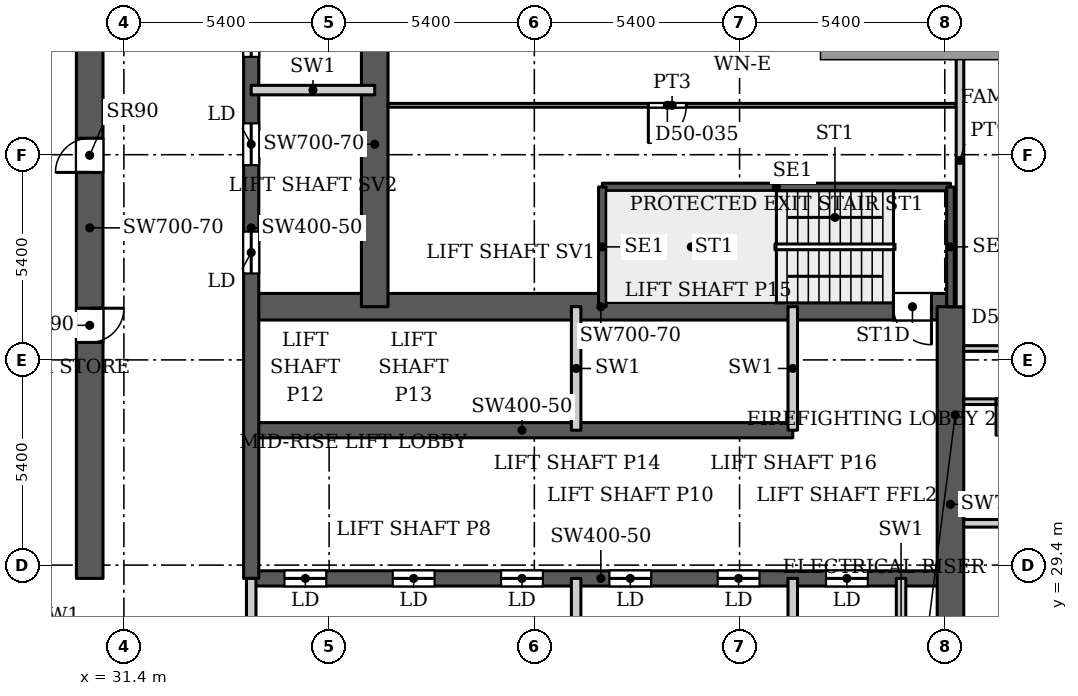
"""IFC4 building model, lengths in metres.
Left out: names, types, materials, properties, quantities, classifications, styles, units other than length and angle.
Written with IfcOpenShell. Run it as: python <this file> out.ifc"""

import sys

from ifc_helpers import new_model, si_unit, direction, frame, frame_2d, origin, place, context, subcontext, project, spatial, rectangle, extrude, source, transform, mapped, element, fill, save


model = new_model("IFC4")
c1 = context("Model", 3, precision=1e-05, world=origin(), true_north=direction((0.0, 1.0)))
c2 = subcontext(c1, "Body", "Model", "MODEL_VIEW")
j1 = project(units=[si_unit("LENGTHUNIT", "METRE"), si_unit("PLANEANGLEUNIT", "RADIAN")], contexts=[c1])
p1 = place(None, origin())
s1 = spatial("IfcSite", under=j1, at=p1, CompositionType="ELEMENT")
p2 = place(p1, origin())
s2 = spatial("IfcBuilding", under=s1, at=p2, CompositionType="ELEMENT")
p3 = place(p2, frame((0.0, 0.0, 216.2)))
s3 = spatial("IfcBuildingStorey", under=s2, at=p3, CompositionType="ELEMENT", Elevation=216.2)
p4 = place(p3, frame((34.75, 29.05, 0.0), z_axis=(0.0, 0.0, 1.0), x_axis=(1.0, 0.0, 0.0)))
e1 = element("IfcWall", 1, at=p4, inside=s3, PredefinedType="SHEAR", context=c2, shape_type="SweptSolid", body=[
    extrude(rectangle(XDim=18.4, YDim=0.4, at=frame_2d((9.2, 0.0))), origin(), (0.0, 0.0, 1.0), 3.9),
])
p5 = place(p4, frame((0.875, 0.0, 0.0)))
e2 = element("IfcOpeningElement", 2, at=p5, cuts=e1, PredefinedType="OPENING", context=c2, shape_type="SweptSolid", body=[
    extrude(rectangle(XDim=1.1, YDim=2.2, at=frame_2d((0.55, 1.1))), frame((0.0, 0.21, 0.0), z_axis=(0.0, -1.0, 0.0), x_axis=(1.0, 0.0, 0.0)), (0.0, 0.0, 1.0), 0.42),
])
p6 = place(p4, frame((3.725, 0.0, 0.0)))
e3 = element("IfcOpeningElement", 3, at=p6, cuts=e1, PredefinedType="OPENING", context=c2, shape_type="SweptSolid", body=[
    extrude(rectangle(XDim=1.1, YDim=2.2, at=frame_2d((0.55, 1.1))), frame((0.0, 0.21, 0.0), z_axis=(0.0, -1.0, 0.0), x_axis=(1.0, 0.0, 0.0)), (0.0, 0.0, 1.0), 0.42),
])
p7 = place(p4, frame((6.575, 0.0, 0.0)))
e4 = element("IfcOpeningElement", 4, at=p7, cuts=e1, PredefinedType="OPENING", context=c2, shape_type="SweptSolid", body=[
    extrude(rectangle(XDim=1.1, YDim=2.2, at=frame_2d((0.55, 1.1))), frame((0.0, 0.21, 0.0), z_axis=(0.0, -1.0, 0.0), x_axis=(1.0, 0.0, 0.0)), (0.0, 0.0, 1.0), 0.42),
])
p8 = place(p4, frame((9.425, 0.0, 0.0)))
e5 = element("IfcOpeningElement", 5, at=p8, cuts=e1, PredefinedType="OPENING", context=c2, shape_type="SweptSolid", body=[
    extrude(rectangle(XDim=1.1, YDim=2.2, at=frame_2d((0.55, 1.1))), frame((0.0, 0.21, 0.0), z_axis=(0.0, -1.0, 0.0), x_axis=(1.0, 0.0, 0.0)), (0.0, 0.0, 1.0), 0.42),
])
p9 = place(p4, frame((12.275, 0.0, 0.0)))
e6 = element("IfcOpeningElement", 6, at=p9, cuts=e1, PredefinedType="OPENING", context=c2, shape_type="SweptSolid", body=[
    extrude(rectangle(XDim=1.1, YDim=2.2, at=frame_2d((0.55, 1.1))), frame((0.0, 0.21, 0.0), z_axis=(0.0, -1.0, 0.0), x_axis=(1.0, 0.0, 0.0)), (0.0, 0.0, 1.0), 0.42),
])
p10 = place(p4, frame((15.125, 0.0, 0.0)))
e7 = element("IfcOpeningElement", 7, at=p10, cuts=e1, PredefinedType="OPENING", context=c2, shape_type="SweptSolid", body=[
    extrude(rectangle(XDim=1.1, YDim=2.2, at=frame_2d((0.55, 1.1))), frame((0.0, 0.21, 0.0), z_axis=(0.0, -1.0, 0.0), x_axis=(1.0, 0.0, 0.0)), (0.0, 0.0, 1.0), 0.42),
])
p11 = place(p3, frame((34.75, 32.95, 0.0), z_axis=(0.0, 0.0, 1.0), x_axis=(1.0, 0.0, 0.0)))
e8 = element("IfcWall", 8, at=p11, inside=s3, PredefinedType="SHEAR", context=c2, shape_type="SweptSolid", body=[
    extrude(rectangle(XDim=14.25, YDim=0.4, at=frame_2d((7.125, 0.0))), origin(), (0.0, 0.0, 1.0), 3.9),
])
p12 = place(p3, frame((34.75, 36.2, 0.0), z_axis=(0.0, 0.0, 1.0), x_axis=(1.0, 0.0, 0.0)))
e9 = element("IfcWall", 9, at=p12, inside=s3, PredefinedType="SHEAR", context=c2, shape_type="SweptSolid", body=[
    extrude(rectangle(XDim=18.4, YDim=0.7, at=frame_2d((9.2, 0.0))), origin(), (0.0, 0.0, 1.0), 3.9),
])
p13 = place(p12, frame((16.9, 0.0, 0.0)))
e10 = element("IfcOpeningElement", 10, at=p13, cuts=e9, PredefinedType="OPENING", context=c2, shape_type="SweptSolid", body=[
    extrude(rectangle(XDim=1.0, YDim=2.2, at=frame_2d((0.5, 1.1))), frame((0.0, 0.36, 0.0), z_axis=(0.0, -1.0, 0.0), x_axis=(1.0, 0.0, 0.0)), (0.0, 0.0, 1.0), 0.72),
])
p14 = place(p3, frame((34.75, 29.05, 0.0), z_axis=(0.0, 0.0, 1.0), x_axis=(0.0, 1.0, 0.0)))
e11 = element("IfcWall", 11, at=p14, inside=s3, PredefinedType="SHEAR", context=c2, shape_type="SweptSolid", body=[
    extrude(rectangle(XDim=18.45, YDim=0.4, at=frame_2d((9.225, 0.0))), origin(), (0.0, 0.0, 1.0), 3.9),
])
p15 = place(p14, frame((8.025, 0.0, 0.0)))
e12 = element("IfcOpeningElement", 12, at=p15, cuts=e11, PredefinedType="OPENING", context=c2, shape_type="SweptSolid", body=[
    extrude(rectangle(XDim=1.1, YDim=2.2, at=frame_2d((0.55, 1.1))), frame((0.0, 0.21, 0.0), z_axis=(0.0, -1.0, 0.0), x_axis=(1.0, 0.0, 0.0)), (0.0, 0.0, 1.0), 0.42),
])
p16 = place(p14, frame((10.875, 0.0, 0.0)))
e13 = element("IfcOpeningElement", 13, at=p16, cuts=e11, PredefinedType="OPENING", context=c2, shape_type="SweptSolid", body=[
    extrude(rectangle(XDim=1.1, YDim=2.2, at=frame_2d((0.55, 1.1))), frame((0.0, 0.21, 0.0), z_axis=(0.0, -1.0, 0.0), x_axis=(1.0, 0.0, 0.0)), (0.0, 0.0, 1.0), 0.42),
])
p17 = place(p14, frame((13.725, 0.0, 0.0)))
e14 = element("IfcOpeningElement", 14, at=p17, cuts=e11, PredefinedType="OPENING", context=c2, shape_type="SweptSolid", body=[
    extrude(rectangle(XDim=1.1, YDim=2.2, at=frame_2d((0.55, 1.1))), frame((0.0, 0.21, 0.0), z_axis=(0.0, -1.0, 0.0), x_axis=(1.0, 0.0, 0.0)), (0.0, 0.0, 1.0), 0.42),
])
p18 = place(p14, frame((15.95, 0.0, 0.0)))
e15 = element("IfcOpeningElement", 15, at=p18, cuts=e11, PredefinedType="OPENING", context=c2, shape_type="SweptSolid", body=[
    extrude(rectangle(XDim=1.1, YDim=2.2, at=frame_2d((0.55, 1.1))), frame((0.0, 0.21, 0.0), z_axis=(0.0, -1.0, 0.0), x_axis=(1.0, 0.0, 0.0)), (0.0, 0.0, 1.0), 0.42),
])
p19 = place(p3, frame((38.0, 36.2, 0.0), z_axis=(0.0, 0.0, 1.0), x_axis=(0.0, 1.0, 0.0)))
e16 = element("IfcWall", 16, at=p19, inside=s3, PredefinedType="SHEAR", context=c2, shape_type="SweptSolid", body=[
    extrude(rectangle(XDim=8.55, YDim=0.7, at=frame_2d((4.275, 0.0))), origin(), (0.0, 0.0, 1.0), 3.9),
])
p20 = place(p3, frame((30.5, 29.05, 0.0), z_axis=(0.0, 0.0, 1.0), x_axis=(0.0, 1.0, 0.0)))
e17 = element("IfcWall", 17, at=p20, inside=s3, PredefinedType="SHEAR", context=c2, shape_type="SweptSolid", body=[
    extrude(rectangle(XDim=18.45, YDim=0.7, at=frame_2d((9.225, 0.0))), origin(), (0.0, 0.0, 1.0), 3.9),
])
p21 = place(p20, frame((6.21, 0.0, 0.0)))
e18 = element("IfcOpeningElement", 18, at=p21, cuts=e17, PredefinedType="OPENING", context=c2, shape_type="SweptSolid", body=[
    extrude(rectangle(XDim=0.9, YDim=2.2, at=frame_2d((0.45, 1.1))), frame((0.0, 0.36, 0.0), z_axis=(0.0, -1.0, 0.0), x_axis=(1.0, 0.0, 0.0)), (0.0, 0.0, 1.0), 0.72),
])
p22 = place(p20, frame((10.684, 0.0, 0.0)))
e19 = element("IfcOpeningElement", 19, at=p22, cuts=e17, PredefinedType="OPENING", context=c2, shape_type="SweptSolid", body=[
    extrude(rectangle(XDim=0.9, YDim=2.2, at=frame_2d((0.45, 1.1))), frame((0.0, 0.36, 0.0), z_axis=(0.0, -1.0, 0.0), x_axis=(1.0, 0.0, 0.0)), (0.0, 0.0, 1.0), 0.72),
])
p23 = place(p3, frame((53.15, 25.8, 0.0), z_axis=(0.0, 0.0, 1.0), x_axis=(0.0, 1.0, 0.0)))
e20 = element("IfcWall", 20, at=p23, inside=s3, PredefinedType="SHEAR", context=c2, shape_type="SweptSolid", body=[
    extrude(rectangle(XDim=10.4, YDim=0.7, at=frame_2d((5.2, 0.0))), origin(), (0.0, 0.0, 1.0), 3.9),
])
p24 = place(p3, frame((29.712, 26.072, 0.0), z_axis=(0.0, 0.0, 1.0), x_axis=(-0.511028049012, 0.859564036662, 0.0)))
e21 = element("IfcWall", 21, at=p24, inside=s3, PredefinedType="SOLIDWALL", context=c2, shape_type="SweptSolid", body=[
    extrude(rectangle(XDim=4.634, YDim=0.25, at=frame_2d((2.317, 0.0))), origin(), (0.0, 0.0, 1.0), 3.217),
])
p25 = place(p3, frame((27.195, 31.969, 0.0), z_axis=(0.0, 0.0, 1.0), x_axis=(0.052559748861, 0.998617781135, 0.0)))
e22 = element("IfcWall", 22, at=p25, inside=s3, PredefinedType="SOLIDWALL", context=c2, shape_type="SweptSolid", body=[
    extrude(rectangle(XDim=55.972, YDim=0.25, at=frame_2d((27.986, 0.0))), origin(), (0.0, 0.0, 1.0), 3.75),
])
p26 = place(p3, frame((43.99, 39.35, 0.0), z_axis=(0.0, 0.0, 1.0), x_axis=(1.0, 0.0, 0.0)))
e23 = element("IfcWall", 23, at=p26, inside=s3, PredefinedType="SHEAR", context=c2, shape_type="SweptSolid", body=[
    extrude(rectangle(XDim=9.16, YDim=0.2, at=frame_2d((4.58, 0.0))), origin(), (0.0, 0.0, 1.0), 3.9),
])
for number, where, z_axis, x_axis in (
    (24, (43.99, 36.2, 0.0), (0.0, 0.0, 1.0), (0.0, 1.0, 0.0)),
    (25, (53.15, 36.2, 0.0), (0.0, 0.0, 1.0), (0.0, 1.0, 0.0)),
):
    element("IfcWall", number, at=place(p3, frame(where, z_axis=z_axis, x_axis=x_axis)), inside=s3, PredefinedType="SHEAR", context=c2, shape_type="SweptSolid", body=[
        extrude(rectangle(XDim=3.15, YDim=0.2, at=frame_2d((1.575, 0.0))), origin(), (0.0, 0.0, 1.0), 3.9),
    ])
for number, where, z_axis, x_axis in (
    (26, (34.75, 25.8, 0.0), (0.0, 0.0, 1.0), (0.0, 1.0, 0.0)),
    (27, (43.3, 25.8, 0.0), (0.0, 0.0, 1.0), (0.0, 1.0, 0.0)),
    (28, (43.3, 32.95, 0.0), (0.0, 0.0, 1.0), (0.0, 1.0, 0.0)),
    (29, (49.0, 25.8, 0.0), (0.0, 0.0, 1.0), (0.0, 1.0, 0.0)),
    (30, (49.0, 32.95, 0.0), (0.0, 0.0, 1.0), (0.0, 1.0, 0.0)),
    (31, (51.85, 25.8, 0.0), (0.0, 0.0, 1.0), (0.0, 1.0, 0.0)),
    (32, (34.75, 41.9, 0.0), (0.0, 0.0, 1.0), (1.0, 0.0, 0.0)),
):
    element("IfcWall", number, at=place(p3, frame(where, z_axis=z_axis, x_axis=x_axis)), inside=s3, PredefinedType="PARTITIONING", context=c2, shape_type="SweptSolid", body=[
        extrude(rectangle(XDim=3.25, YDim=0.25, at=frame_2d((1.625, 0.0))), origin(), (0.0, 0.0, 1.0), 3.9),
    ])
p27 = place(p3, frame((38.349, 41.5, 0.0), z_axis=(0.0, 0.0, 1.0), x_axis=(1.0, 0.0, 0.0)))
e33 = element("IfcWall", 33, at=p27, inside=s3, PredefinedType="PARTITIONING", context=c2, shape_type="SweptSolid", body=[
    extrude(rectangle(XDim=14.951, YDim=0.1, at=frame_2d((7.476, 0.0))), origin(), (0.0, 0.0, 1.0), 3.6),
])
p28 = place(p27, frame((6.851, 0.0, 0.0)))
e34 = element("IfcOpeningElement", 34, at=p28, cuts=e33, PredefinedType="OPENING", context=c2, shape_type="SweptSolid", body=[
    extrude(rectangle(XDim=1.0, YDim=2.1, at=frame_2d((0.5, 1.05))), frame((0.0, 0.06, 0.0), z_axis=(0.0, -1.0, 0.0), x_axis=(1.0, 0.0, 0.0)), (0.0, 0.0, 1.0), 0.12),
])
p29 = place(p3, frame((53.4, 36.199, 0.0), z_axis=(0.0, 0.0, 1.0), x_axis=(0.0, 1.0, 0.0)))
e35 = element("IfcWall", 35, at=p29, inside=s3, PredefinedType="PARTITIONING", context=c2, shape_type="SweptSolid", body=[
    extrude(rectangle(XDim=7.701, YDim=0.2, at=frame_2d((3.851, 0.0))), origin(), (0.0, 0.0, 1.0), 3.6),
])
p30 = place(p3, frame((53.499, 30.5, 0.0), z_axis=(0.0, 0.0, 1.0), x_axis=(1.0, 0.0, 0.0)))
e36 = element("IfcWall", 36, at=p30, inside=s3, PredefinedType="PARTITIONING", context=c2, shape_type="SweptSolid", body=[
    extrude(rectangle(XDim=28.401, YDim=0.2, at=frame_2d((14.2, 0.0))), origin(), (0.0, 0.0, 1.0), 3.6),
])
p31 = place(p30, frame((10.201, 0.0, 0.0)))
e37 = element("IfcOpeningElement", 37, at=p31, cuts=e36, PredefinedType="OPENING", context=c2, shape_type="SweptSolid", body=[
    extrude(rectangle(XDim=1.0, YDim=2.1, at=frame_2d((0.5, 1.05))), frame((0.0, 0.11, 0.0), z_axis=(0.0, -1.0, 0.0), x_axis=(1.0, 0.0, 0.0)), (0.0, 0.0, 1.0), 0.22),
])
p32 = place(p30, frame((12.151, 0.0, 0.0)))
e38 = element("IfcOpeningElement", 38, at=p32, cuts=e36, PredefinedType="OPENING", context=c2, shape_type="SweptSolid", body=[
    extrude(rectangle(XDim=1.0, YDim=2.1, at=frame_2d((0.5, 1.05))), frame((0.0, 0.11, 0.0), z_axis=(0.0, -1.0, 0.0), x_axis=(1.0, 0.0, 0.0)), (0.0, 0.0, 1.0), 0.22),
])
p33 = place(p30, frame((24.001, 0.0, 0.0)))
e39 = element("IfcOpeningElement", 39, at=p33, cuts=e36, PredefinedType="OPENING", context=c2, shape_type="SweptSolid", body=[
    extrude(rectangle(XDim=1.0, YDim=2.1, at=frame_2d((0.5, 1.05))), frame((0.0, 0.11, 0.0), z_axis=(0.0, -1.0, 0.0), x_axis=(1.0, 0.0, 0.0)), (0.0, 0.0, 1.0), 0.22),
])
p34 = place(p3, frame((53.499, 33.7, 0.0), z_axis=(0.0, 0.0, 1.0), x_axis=(1.0, 0.0, 0.0)))
e40 = element("IfcWall", 40, at=p34, inside=s3, PredefinedType="PARTITIONING", context=c2, shape_type="SweptSolid", body=[
    extrude(rectangle(XDim=9.876, YDim=0.15, at=frame_2d((4.938, 0.0))), origin(), (0.0, 0.0, 1.0), 3.6),
])
p35 = place(p34, frame((6.851, 0.0, 0.0)))
e41 = element("IfcOpeningElement", 41, at=p35, cuts=e40, PredefinedType="OPENING", context=c2, shape_type="SweptSolid", body=[
    extrude(rectangle(XDim=0.8, YDim=2.1, at=frame_2d((0.4, 1.05))), frame((0.0, 0.085, 0.0), z_axis=(0.0, -1.0, 0.0), x_axis=(1.0, 0.0, 0.0)), (0.0, 0.0, 1.0), 0.17),
])
p36 = place(p34, frame((0.851, 0.0, 0.0)))
e42 = element("IfcOpeningElement", 42, at=p36, cuts=e40, PredefinedType="OPENING", context=c2, shape_type="SweptSolid", body=[
    extrude(rectangle(XDim=0.9, YDim=2.1, at=frame_2d((0.45, 1.05))), frame((0.0, 0.085, 0.0), z_axis=(0.0, -1.0, 0.0), x_axis=(1.0, 0.0, 0.0)), (0.0, 0.0, 1.0), 0.17),
])
p37 = place(p34, frame((4.901, 0.0, 0.0)))
e43 = element("IfcOpeningElement", 43, at=p37, cuts=e40, PredefinedType="OPENING", context=c2, shape_type="SweptSolid", body=[
    extrude(rectangle(XDim=0.8, YDim=2.1, at=frame_2d((0.4, 1.05))), frame((0.0, 0.085, 0.0), z_axis=(0.0, -1.0, 0.0), x_axis=(1.0, 0.0, 0.0)), (0.0, 0.0, 1.0), 0.17),
])
p38 = place(p34, frame((8.651, 0.0, 0.0)))
e44 = element("IfcOpeningElement", 44, at=p38, cuts=e40, PredefinedType="OPENING", context=c2, shape_type="SweptSolid", body=[
    extrude(rectangle(XDim=0.8, YDim=2.1, at=frame_2d((0.4, 1.05))), frame((0.0, 0.085, 0.0), z_axis=(0.0, -1.0, 0.0), x_axis=(1.0, 0.0, 0.0)), (0.0, 0.0, 1.0), 0.17),
])
p39 = place(p3, frame((53.499, 35.1, 0.0), z_axis=(0.0, 0.0, 1.0), x_axis=(1.0, 0.0, 0.0)))
e45 = element("IfcWall", 45, at=p39, inside=s3, PredefinedType="PARTITIONING", context=c2, shape_type="SweptSolid", body=[
    extrude(rectangle(XDim=11.501, YDim=0.15, at=frame_2d((5.75, 0.0))), origin(), (0.0, 0.0, 1.0), 3.6),
])
p40 = place(p39, frame((5.001, 0.0, 0.0)))
e46 = element("IfcOpeningElement", 46, at=p40, cuts=e45, PredefinedType="OPENING", context=c2, shape_type="SweptSolid", body=[
    extrude(rectangle(XDim=0.9, YDim=2.1, at=frame_2d((0.45, 1.05))), frame((0.0, 0.085, 0.0), z_axis=(0.0, -1.0, 0.0), x_axis=(1.0, 0.0, 0.0)), (0.0, 0.0, 1.0), 0.17),
])
p41 = place(p39, frame((1.701, 0.0, 0.0)))
e47 = element("IfcOpeningElement", 47, at=p41, cuts=e45, PredefinedType="OPENING", context=c2, shape_type="SweptSolid", body=[
    extrude(rectangle(XDim=1.0, YDim=2.1, at=frame_2d((0.5, 1.05))), frame((0.0, 0.085, 0.0), z_axis=(0.0, -1.0, 0.0), x_axis=(1.0, 0.0, 0.0)), (0.0, 0.0, 1.0), 0.17),
])
p42 = place(p39, frame((7.701, 0.0, 0.0)))
e48 = element("IfcOpeningElement", 48, at=p42, cuts=e45, PredefinedType="OPENING", context=c2, shape_type="SweptSolid", body=[
    extrude(rectangle(XDim=0.9, YDim=2.1, at=frame_2d((0.45, 1.05))), frame((0.0, 0.085, 0.0), z_axis=(0.0, -1.0, 0.0), x_axis=(1.0, 0.0, 0.0)), (0.0, 0.0, 1.0), 0.17),
])
m1 = source(origin(), c2, "Body", "SweptSolid", [
    extrude(rectangle(XDim=1.1, YDim=2.2, at=frame_2d((0.55, 1.1))), frame((0.0, 0.025, 0.0), z_axis=(0.0, -1.0, 0.0), x_axis=(1.0, 0.0, 0.0)), (0.0, 0.0, 1.0), 0.05),
])
p43 = place(p5, origin())
e49 = element("IfcDoor", 49, at=p43, inside=s3, OperationType="SLIDING_TO_LEFT", PredefinedType="DOOR", context=c2, shape_type="MappedRepresentation", body=[
    mapped(m1, transform((0.0, 0.0, 0.0), x_axis=(1.0, 0.0, 0.0), y_axis=(0.0, 1.0, 0.0), z_axis=(0.0, 0.0, 1.0), scale=1.0)),
])
fill(e2, e49)
p44 = place(p6, origin())
e50 = element("IfcDoor", 50, at=p44, inside=s3, OperationType="SLIDING_TO_LEFT", PredefinedType="DOOR", context=c2, shape_type="MappedRepresentation", body=[
    mapped(m1, transform((0.0, 0.0, 0.0), x_axis=(1.0, 0.0, 0.0), y_axis=(0.0, 1.0, 0.0), z_axis=(0.0, 0.0, 1.0), scale=1.0)),
])
fill(e3, e50)
p45 = place(p7, origin())
e51 = element("IfcDoor", 51, at=p45, inside=s3, OperationType="SLIDING_TO_LEFT", PredefinedType="DOOR", context=c2, shape_type="MappedRepresentation", body=[
    mapped(m1, transform((0.0, 0.0, 0.0), x_axis=(1.0, 0.0, 0.0), y_axis=(0.0, 1.0, 0.0), z_axis=(0.0, 0.0, 1.0), scale=1.0)),
])
fill(e4, e51)
p46 = place(p8, origin())
e52 = element("IfcDoor", 52, at=p46, inside=s3, OperationType="SLIDING_TO_LEFT", PredefinedType="DOOR", context=c2, shape_type="MappedRepresentation", body=[
    mapped(m1, transform((0.0, 0.0, 0.0), x_axis=(1.0, 0.0, 0.0), y_axis=(0.0, 1.0, 0.0), z_axis=(0.0, 0.0, 1.0), scale=1.0)),
])
fill(e5, e52)
p47 = place(p9, origin())
e53 = element("IfcDoor", 53, at=p47, inside=s3, OperationType="SLIDING_TO_LEFT", PredefinedType="DOOR", context=c2, shape_type="MappedRepresentation", body=[
    mapped(m1, transform((0.0, 0.0, 0.0), x_axis=(1.0, 0.0, 0.0), y_axis=(0.0, 1.0, 0.0), z_axis=(0.0, 0.0, 1.0), scale=1.0)),
])
fill(e6, e53)
p48 = place(p15, origin())
e54 = element("IfcDoor", 54, at=p48, inside=s3, OperationType="SLIDING_TO_LEFT", PredefinedType="DOOR", context=c2, shape_type="MappedRepresentation", body=[
    mapped(m1, transform((0.0, 0.0, 0.0), x_axis=(1.0, 0.0, 0.0), y_axis=(0.0, 1.0, 0.0), z_axis=(0.0, 0.0, 1.0), scale=1.0)),
])
fill(e12, e54)
p49 = place(p16, origin())
e55 = element("IfcDoor", 55, at=p49, inside=s3, OperationType="SLIDING_TO_LEFT", PredefinedType="DOOR", context=c2, shape_type="MappedRepresentation", body=[
    mapped(m1, transform((0.0, 0.0, 0.0), x_axis=(1.0, 0.0, 0.0), y_axis=(0.0, 1.0, 0.0), z_axis=(0.0, 0.0, 1.0), scale=1.0)),
])
fill(e13, e55)
p50 = place(p17, origin())
e56 = element("IfcDoor", 56, at=p50, inside=s3, OperationType="SLIDING_TO_LEFT", PredefinedType="DOOR", context=c2, shape_type="MappedRepresentation", body=[
    mapped(m1, transform((0.0, 0.0, 0.0), x_axis=(1.0, 0.0, 0.0), y_axis=(0.0, 1.0, 0.0), z_axis=(0.0, 0.0, 1.0), scale=1.0)),
])
fill(e14, e56)
p51 = place(p10, origin())
e57 = element("IfcDoor", 57, at=p51, inside=s3, OperationType="SLIDING_TO_LEFT", PredefinedType="DOOR", context=c2, shape_type="MappedRepresentation", body=[
    mapped(m1, transform((0.0, 0.0, 0.0), x_axis=(1.0, 0.0, 0.0), y_axis=(0.0, 1.0, 0.0), z_axis=(0.0, 0.0, 1.0), scale=1.0)),
])
fill(e7, e57)
m2 = source(origin(), c2, "Body", "SweptSolid", [
    extrude(rectangle(XDim=0.9, YDim=2.2, at=frame_2d((0.45, 1.1))), frame((0.0, 0.025, 0.0), z_axis=(0.0, -1.0, 0.0), x_axis=(1.0, 0.0, 0.0)), (0.0, 0.0, 1.0), 0.05),
])
p52 = place(p21, origin())
e58 = element("IfcDoor", 58, at=p52, inside=s3, OperationType="SINGLE_SWING_RIGHT", PredefinedType="DOOR", context=c2, shape_type="MappedRepresentation", body=[
    mapped(m2, transform((0.0, 0.0, 0.0), x_axis=(1.0, 0.0, 0.0), y_axis=(0.0, 1.0, 0.0), z_axis=(0.0, 0.0, 1.0), scale=1.0)),
])
fill(e18, e58)
p53 = place(p22, origin())
e59 = element("IfcDoor", 59, at=p53, inside=s3, OperationType="SINGLE_SWING_LEFT", PredefinedType="DOOR", context=c2, shape_type="MappedRepresentation", body=[
    mapped(m2, transform((0.0, 0.0, 0.0), x_axis=(1.0, 0.0, 0.0), y_axis=(0.0, 1.0, 0.0), z_axis=(0.0, 0.0, 1.0), scale=1.0)),
])
fill(e19, e59)
m3 = source(origin(), c2, "Body", "SweptSolid", [
    extrude(rectangle(XDim=1.0, YDim=2.2, at=frame_2d((0.5, 1.1))), frame((0.0, 0.025, 0.0), z_axis=(0.0, -1.0, 0.0), x_axis=(1.0, 0.0, 0.0)), (0.0, 0.0, 1.0), 0.05),
])
p54 = place(p13, origin())
e60 = element("IfcDoor", 60, at=p54, inside=s3, OperationType="SINGLE_SWING_RIGHT", PredefinedType="DOOR", context=c2, shape_type="MappedRepresentation", body=[
    mapped(m3, transform((0.0, 0.0, 0.0), x_axis=(1.0, 0.0, 0.0), y_axis=(0.0, 1.0, 0.0), z_axis=(0.0, 0.0, 1.0), scale=1.0)),
])
fill(e10, e60)
m4 = source(origin(), c2, "Body", "SweptSolid", [
    extrude(rectangle(XDim=0.9, YDim=2.1, at=frame_2d((0.45, 1.05))), frame((0.0, 0.025, 0.0), z_axis=(0.0, -1.0, 0.0), x_axis=(1.0, 0.0, 0.0)), (0.0, 0.0, 1.0), 0.05),
])
p55 = place(p36, origin())
e61 = element("IfcDoor", 61, at=p55, inside=s3, OperationType="SINGLE_SWING_RIGHT", PredefinedType="DOOR", context=c2, shape_type="MappedRepresentation", body=[
    mapped(m4, transform((0.0, 0.0, 0.0), x_axis=(1.0, 0.0, 0.0), y_axis=(0.0, 1.0, 0.0), z_axis=(0.0, 0.0, 1.0), scale=1.0)),
])
fill(e42, e61)
m5 = source(origin(), c2, "Body", "SweptSolid", [
    extrude(rectangle(XDim=1.0, YDim=2.1, at=frame_2d((0.5, 1.05))), frame((0.0, 0.025, 0.0), z_axis=(0.0, -1.0, 0.0), x_axis=(1.0, 0.0, 0.0)), (0.0, 0.0, 1.0), 0.05),
])
p56 = place(p28, origin())
e62 = element("IfcDoor", 62, at=p56, inside=s3, OperationType="SINGLE_SWING_RIGHT", PredefinedType="DOOR", context=c2, shape_type="MappedRepresentation", body=[
    mapped(m5, transform((0.0, 0.0, 0.0), x_axis=(1.0, 0.0, 0.0), y_axis=(0.0, 1.0, 0.0), z_axis=(0.0, 0.0, 1.0), scale=1.0)),
])
fill(e34, e62)
save(model, sys.argv[1])
